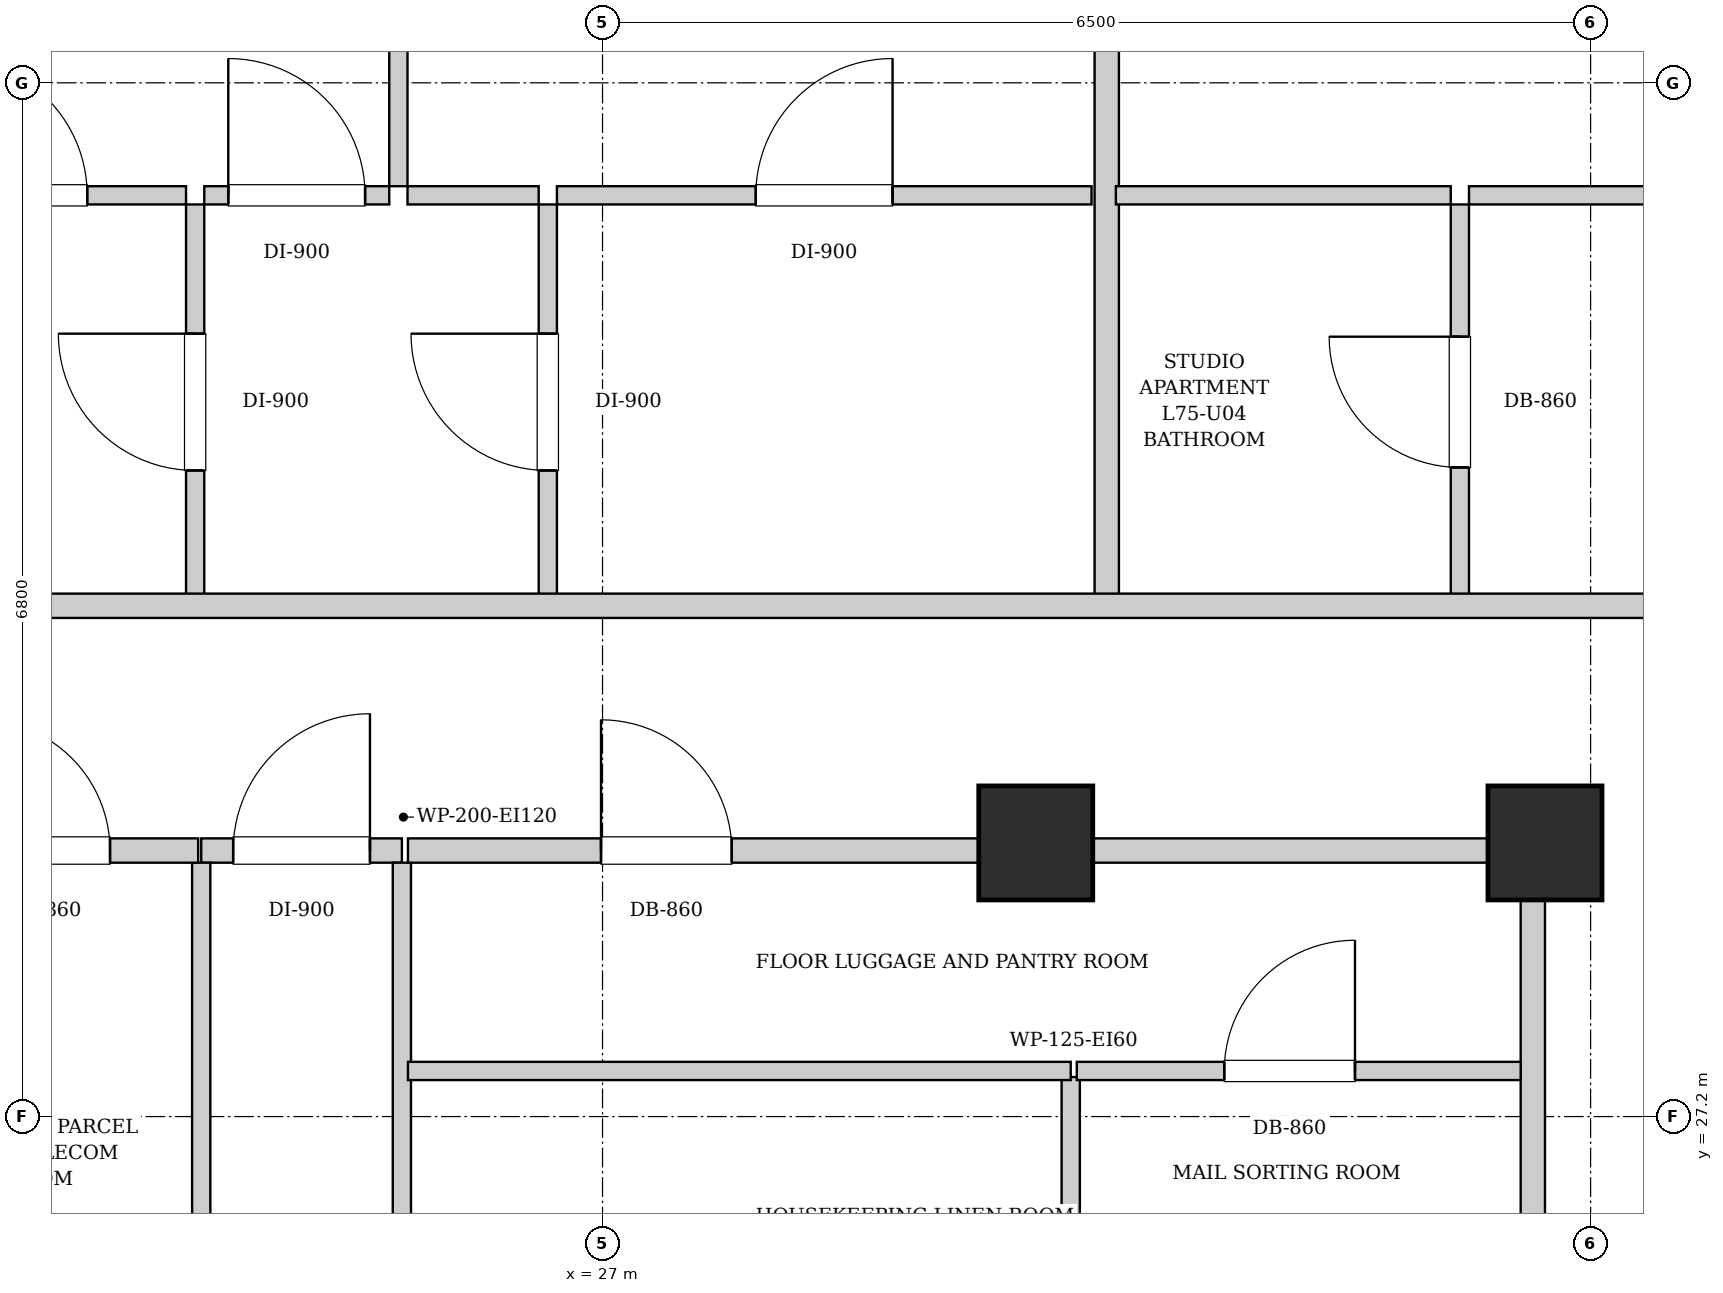
"""IFC4 building model, lengths in metres.
Left out: names, types, materials, properties, quantities, classifications, styles, units other than length and angle.
Written with IfcOpenShell. Run it as: python <this file> out.ifc"""

import sys

from ifc_helpers import new_model, si_unit, direction, frame, frame_2d, origin, origin_2d, place, context, subcontext, project, spatial, rectangle, extrude, element, fill, save


model = new_model("IFC4")
c1 = context("Model", 3, precision=1e-05, world=origin(), true_north=direction((0.0, 1.0)))
c2 = subcontext(c1, "Body", "Model", "MODEL_VIEW")
j1 = project(units=[si_unit("LENGTHUNIT", "METRE"), si_unit("PLANEANGLEUNIT", "RADIAN")], contexts=[c1])
p1 = place(None, origin())
s1 = spatial("IfcSite", under=j1, at=p1, CompositionType="ELEMENT")
p2 = place(p1, origin())
s2 = spatial("IfcBuilding", under=s1, at=p2, CompositionType="ELEMENT")
p3 = place(p2, frame((0.0, 0.0, 258.1)))
s3 = spatial("IfcBuildingStorey", under=s2, at=p3, CompositionType="ELEMENT", Elevation=258.1)
for number, where, z_axis, x_axis in (
    (1, (29.85, 29.0, 0.0), (0.0, 0.0, 1.0), (1.0, 0.0, 0.0)),
    (2, (33.2, 29.0, 0.0), (0.0, 0.0, 1.0), (1.0, 0.0, 0.0)),
):
    element("IfcColumn", number, at=place(p3, frame(where, z_axis=z_axis, x_axis=x_axis)), inside=s3, PredefinedType="COLUMN", context=c2, shape_type="SweptSolid", body=[
        extrude(rectangle(XDim=0.75, YDim=0.75, at=origin_2d()), origin(), (0.0, 0.0, 1.0), 3.4),
    ])
p4 = place(p3, frame((33.12, 24.12, 0.0), z_axis=(0.0, 0.0, 1.0), x_axis=(0.0, 1.0, 0.0)))
e3 = element("IfcWall", 3, at=p4, inside=s3, PredefinedType="PARTITIONING", context=c2, shape_type="SweptSolid", body=[
    extrude(rectangle(XDim=4.76, YDim=0.16, at=frame_2d((2.38, 0.0))), origin(), (0.0, 0.0, 1.0), 2.385),
])
p5 = place(p3, frame((24.36, 28.95, 0.0), z_axis=(0.0, 0.0, 1.0), x_axis=(1.0, 0.0, 0.0)))
e4 = element("IfcWall", 4, at=p5, inside=s3, PredefinedType="PARTITIONING", context=c2, shape_type="SweptSolid", body=[
    extrude(rectangle(XDim=1.32, YDim=0.16, at=frame_2d((0.66, 0.0))), origin(), (0.0, 0.0, 1.0), 2.578),
])
p6 = place(p5, frame((0.21, 0.0, 0.0)))
e5 = element("IfcOpeningElement", 5, at=p6, cuts=e4, PredefinedType="OPENING", context=c2, shape_type="SweptSolid", body=[
    extrude(rectangle(XDim=0.9, YDim=2.05, at=frame_2d((0.45, 1.025))), frame((0.0, 0.09, 0.0), z_axis=(0.0, -1.0, 0.0), x_axis=(1.0, 0.0, 0.0)), (0.0, 0.0, 1.0), 0.18),
])
for number, where, z_axis, x_axis in (
    (6, (24.36, 25.0, 0.0), (0.0, 0.0, 1.0), (0.0, 1.0, 0.0)),
    (7, (25.68, 25.0, 0.0), (0.0, 0.0, 1.0), (0.0, 1.0, 0.0)),
):
    element("IfcWall", number, at=place(p3, frame(where, z_axis=z_axis, x_axis=x_axis)), inside=s3, PredefinedType="PARTITIONING", context=c2, shape_type="SweptSolid", body=[
        extrude(rectangle(XDim=3.87, YDim=0.12, at=frame_2d((1.935, 0.0))), origin(), (0.0, 0.0, 1.0), 3.05),
    ])
p7 = place(p3, frame((30.08, 26.18, 0.0), z_axis=(0.0, 0.0, 1.0), x_axis=(0.0, 1.0, 0.0)))
e8 = element("IfcWall", 8, at=p7, inside=s3, PredefinedType="PARTITIONING", context=c2, shape_type="SweptSolid", body=[
    extrude(rectangle(XDim=1.28, YDim=0.12, at=frame_2d((0.64, 0.0))), origin(), (0.0, 0.0, 1.0), 3.05),
])
p8 = place(p3, frame((30.12, 27.5, 0.0), z_axis=(0.0, 0.0, 1.0), x_axis=(1.0, 0.0, 0.0)))
e9 = element("IfcWall", 9, at=p8, inside=s3, PredefinedType="PARTITIONING", context=c2, shape_type="SweptSolid", body=[
    extrude(rectangle(XDim=2.92, YDim=0.12, at=frame_2d((1.46, 0.0))), origin(), (0.0, 0.0, 1.0), 3.05),
])
p9 = place(p8, frame((0.97, 0.0, 0.0)))
e10 = element("IfcOpeningElement", 10, at=p9, cuts=e9, PredefinedType="OPENING", context=c2, shape_type="SweptSolid", body=[
    extrude(rectangle(XDim=0.86, YDim=2.05, at=frame_2d((0.43, 1.025))), frame((0.0, 0.07, 0.0), z_axis=(0.0, -1.0, 0.0), x_axis=(1.0, 0.0, 0.0)), (0.0, 0.0, 1.0), 0.14),
])
p10 = place(p3, frame((22.28, 28.95, 0.0), z_axis=(0.0, 0.0, 1.0), x_axis=(1.0, 0.0, 0.0)))
e11 = element("IfcWall", 11, at=p10, inside=s3, PredefinedType="PARTITIONING", context=c2, shape_type="SweptSolid", body=[
    extrude(rectangle(XDim=2.06, YDim=0.16, at=frame_2d((1.03, 0.0))), origin(), (0.0, 0.0, 1.0), 2.578),
])
p11 = place(p10, frame((0.62, 0.0, 0.0)))
e12 = element("IfcOpeningElement", 12, at=p11, cuts=e11, PredefinedType="OPENING", context=c2, shape_type="SweptSolid", body=[
    extrude(rectangle(XDim=0.86, YDim=2.05, at=frame_2d((0.43, 1.025))), frame((0.0, 0.09, 0.0), z_axis=(0.0, -1.0, 0.0), x_axis=(1.0, 0.0, 0.0)), (0.0, 0.0, 1.0), 0.18),
])
p12 = place(p3, frame((25.72, 27.5, 0.0), z_axis=(0.0, 0.0, 1.0), x_axis=(1.0, 0.0, 0.0)))
e13 = element("IfcWall", 13, at=p12, inside=s3, PredefinedType="PARTITIONING", context=c2, shape_type="SweptSolid", body=[
    extrude(rectangle(XDim=4.36, YDim=0.12, at=frame_2d((2.18, 0.0))), origin(), (0.0, 0.0, 1.0), 3.05),
])
p13 = place(p3, frame((25.72, 28.95, 0.0), z_axis=(0.0, 0.0, 1.0), x_axis=(1.0, 0.0, 0.0)))
e14 = element("IfcWall", 14, at=p13, inside=s3, PredefinedType="PARTITIONING", context=c2, shape_type="SweptSolid", body=[
    extrude(rectangle(XDim=7.32, YDim=0.16, at=frame_2d((3.66, 0.0))), origin(), (0.0, 0.0, 1.0), 2.578),
])
p14 = place(p13, frame((1.27, 0.0, 0.0)))
e15 = element("IfcOpeningElement", 15, at=p14, cuts=e14, PredefinedType="OPENING", context=c2, shape_type="SweptSolid", body=[
    extrude(rectangle(XDim=0.86, YDim=2.05, at=frame_2d((0.43, 1.025))), frame((0.0, 0.09, 0.0), z_axis=(0.0, -1.0, 0.0), x_axis=(1.0, 0.0, 0.0)), (0.0, 0.0, 1.0), 0.18),
])
p15 = place(p3, frame((24.32, 30.6, 0.0), z_axis=(0.0, 0.0, 1.0), x_axis=(0.0, 1.0, 0.0)))
e16 = element("IfcWall", 16, at=p15, inside=s3, PredefinedType="PARTITIONING", context=c2, shape_type="SweptSolid", body=[
    extrude(rectangle(XDim=2.6, YDim=0.12, at=frame_2d((1.3, 0.0))), origin(), (0.0, 0.0, 1.0), 3.05),
])
p16 = place(p15, frame((0.85, 0.0, 0.0)))
e17 = element("IfcOpeningElement", 17, at=p16, cuts=e16, PredefinedType="OPENING", context=c2, shape_type="SweptSolid", body=[
    extrude(rectangle(XDim=0.9, YDim=2.05, at=frame_2d((0.45, 1.025))), frame((0.0, 0.07, 0.0), z_axis=(0.0, -1.0, 0.0), x_axis=(1.0, 0.0, 0.0)), (0.0, 0.0, 1.0), 0.14),
])
p17 = place(p3, frame((22.06, 33.26, 0.0), z_axis=(0.0, 0.0, 1.0), x_axis=(1.0, 0.0, 0.0)))
e18 = element("IfcWall", 18, at=p17, inside=s3, PredefinedType="PARTITIONING", context=c2, shape_type="SweptSolid", body=[
    extrude(rectangle(XDim=2.2, YDim=0.12, at=frame_2d((1.1, 0.0))), origin(), (0.0, 0.0, 1.0), 3.05),
])
p18 = place(p17, frame((0.65, 0.0, 0.0)))
e19 = element("IfcOpeningElement", 19, at=p18, cuts=e18, PredefinedType="OPENING", context=c2, shape_type="SweptSolid", body=[
    extrude(rectangle(XDim=0.9, YDim=2.05, at=frame_2d((0.45, 1.025))), frame((0.0, 0.07, 0.0), z_axis=(0.0, -1.0, 0.0), x_axis=(1.0, 0.0, 0.0)), (0.0, 0.0, 1.0), 0.14),
])
p19 = place(p3, frame((26.64, 30.6, 0.0), z_axis=(0.0, 0.0, 1.0), x_axis=(0.0, 1.0, 0.0)))
e20 = element("IfcWall", 20, at=p19, inside=s3, PredefinedType="PARTITIONING", context=c2, shape_type="SweptSolid", body=[
    extrude(rectangle(XDim=2.6, YDim=0.12, at=frame_2d((1.3, 0.0))), origin(), (0.0, 0.0, 1.0), 3.05),
])
p20 = place(p19, frame((0.85, 0.0, 0.0)))
e21 = element("IfcOpeningElement", 21, at=p20, cuts=e20, PredefinedType="OPENING", context=c2, shape_type="SweptSolid", body=[
    extrude(rectangle(XDim=0.9, YDim=2.05, at=frame_2d((0.45, 1.025))), frame((0.0, 0.07, 0.0), z_axis=(0.0, -1.0, 0.0), x_axis=(1.0, 0.0, 0.0)), (0.0, 0.0, 1.0), 0.14),
])
p21 = place(p3, frame((24.38, 33.26, 0.0), z_axis=(0.0, 0.0, 1.0), x_axis=(1.0, 0.0, 0.0)))
e22 = element("IfcWall", 22, at=p21, inside=s3, PredefinedType="PARTITIONING", context=c2, shape_type="SweptSolid", body=[
    extrude(rectangle(XDim=1.217, YDim=0.12, at=frame_2d((0.608, 0.0))), origin(), (0.0, 0.0, 1.0), 3.05),
])
p22 = place(p21, frame((0.158, 0.0, 0.0)))
e23 = element("IfcOpeningElement", 23, at=p22, cuts=e22, PredefinedType="OPENING", context=c2, shape_type="SweptSolid", body=[
    extrude(rectangle(XDim=0.9, YDim=2.05, at=frame_2d((0.45, 1.025))), frame((0.0, 0.07, 0.0), z_axis=(0.0, -1.0, 0.0), x_axis=(1.0, 0.0, 0.0)), (0.0, 0.0, 1.0), 0.14),
])
p23 = place(p3, frame((25.717, 33.26, 0.0), z_axis=(0.0, 0.0, 1.0), x_axis=(1.0, 0.0, 0.0)))
e24 = element("IfcWall", 24, at=p23, inside=s3, PredefinedType="PARTITIONING", context=c2, shape_type="SweptSolid", body=[
    extrude(rectangle(XDim=0.863, YDim=0.12, at=frame_2d((0.432, 0.0))), origin(), (0.0, 0.0, 1.0), 3.05),
])
p24 = place(p3, frame((26.7, 33.26, 0.0), z_axis=(0.0, 0.0, 1.0), x_axis=(1.0, 0.0, 0.0)))
e25 = element("IfcWall", 25, at=p24, inside=s3, PredefinedType="PARTITIONING", context=c2, shape_type="SweptSolid", body=[
    extrude(rectangle(XDim=3.517, YDim=0.12, at=frame_2d((1.759, 0.0))), origin(), (0.0, 0.0, 1.0), 3.05),
])
p25 = place(p24, frame((1.308, 0.0, 0.0)))
e26 = element("IfcOpeningElement", 26, at=p25, cuts=e25, PredefinedType="OPENING", context=c2, shape_type="SweptSolid", body=[
    extrude(rectangle(XDim=0.9, YDim=2.05, at=frame_2d((0.45, 1.025))), frame((0.0, 0.07, 0.0), z_axis=(0.0, -1.0, 0.0), x_axis=(1.0, 0.0, 0.0)), (0.0, 0.0, 1.0), 0.14),
])
p26 = place(p3, frame((25.657, 33.32, 0.0), z_axis=(0.0, 0.0, 1.0), x_axis=(0.0, 1.0, 0.0)))
e27 = element("IfcWall", 27, at=p26, inside=s3, PredefinedType="PARTITIONING", context=c2, shape_type="SweptSolid", body=[
    extrude(rectangle(XDim=6.6, YDim=0.12, at=frame_2d((3.3, 0.0))), origin(), (0.0, 0.0, 1.0), 3.05),
])
p27 = place(p26, frame((2.835, 0.0, 0.0)))
e28 = element("IfcOpeningElement", 28, at=p27, cuts=e27, PredefinedType="OPENING", context=c2, shape_type="SweptSolid", body=[
    extrude(rectangle(XDim=0.9, YDim=2.05, at=frame_2d((0.45, 1.025))), frame((0.0, 0.07, 0.0), z_axis=(0.0, -1.0, 0.0), x_axis=(1.0, 0.0, 0.0)), (0.0, 0.0, 1.0), 0.14),
])
p28 = place(p3, frame((30.317, 30.6, 0.0), z_axis=(0.0, 0.0, 1.0), x_axis=(0.0, 1.0, 0.0)))
e29 = element("IfcWall", 29, at=p28, inside=s3, PredefinedType="PARTITIONING", context=c2, shape_type="SweptSolid", body=[
    extrude(rectangle(XDim=9.32, YDim=0.16, at=frame_2d((4.66, 0.0))), origin(), (0.0, 0.0, 1.0), 3.05),
])
p29 = place(p3, frame((32.64, 30.6, 0.0), z_axis=(0.0, 0.0, 1.0), x_axis=(0.0, 1.0, 0.0)))
e30 = element("IfcWall", 30, at=p29, inside=s3, PredefinedType="PARTITIONING", context=c2, shape_type="SweptSolid", body=[
    extrude(rectangle(XDim=2.6, YDim=0.12, at=frame_2d((1.3, 0.0))), origin(), (0.0, 0.0, 1.0), 3.05),
])
p30 = place(p29, frame((0.87, 0.0, 0.0)))
e31 = element("IfcOpeningElement", 31, at=p30, cuts=e30, PredefinedType="OPENING", context=c2, shape_type="SweptSolid", body=[
    extrude(rectangle(XDim=0.86, YDim=2.05, at=frame_2d((0.43, 1.025))), frame((0.0, 0.07, 0.0), z_axis=(0.0, -1.0, 0.0), x_axis=(1.0, 0.0, 0.0)), (0.0, 0.0, 1.0), 0.14),
])
p31 = place(p3, frame((30.377, 33.26, 0.0), z_axis=(0.0, 0.0, 1.0), x_axis=(1.0, 0.0, 0.0)))
e32 = element("IfcWall", 32, at=p31, inside=s3, PredefinedType="PARTITIONING", context=c2, shape_type="SweptSolid", body=[
    extrude(rectangle(XDim=2.203, YDim=0.12, at=frame_2d((1.102, 0.0))), origin(), (0.0, 0.0, 1.0), 3.05),
])
p32 = place(p3, frame((32.7, 33.26, 0.0), z_axis=(0.0, 0.0, 1.0), x_axis=(1.0, 0.0, 0.0)))
e33 = element("IfcWall", 33, at=p32, inside=s3, PredefinedType="PARTITIONING", context=c2, shape_type="SweptSolid", body=[
    extrude(rectangle(XDim=5.02, YDim=0.12, at=frame_2d((2.51, 0.0))), origin(), (0.0, 0.0, 1.0), 3.05),
])
p33 = place(p32, frame((2.06, 0.0, 0.0)))
e34 = element("IfcOpeningElement", 34, at=p33, cuts=e33, PredefinedType="OPENING", context=c2, shape_type="SweptSolid", body=[
    extrude(rectangle(XDim=0.9, YDim=2.05, at=frame_2d((0.45, 1.025))), frame((0.0, 0.07, 0.0), z_axis=(0.0, -1.0, 0.0), x_axis=(1.0, 0.0, 0.0)), (0.0, 0.0, 1.0), 0.14),
])
p34 = place(p3, frame((13.15, 30.56, 0.0), z_axis=(0.0, 0.0, 1.0), x_axis=(1.0, 0.0, 0.0)))
e35 = element("IfcWall", 35, at=p34, inside=s3, PredefinedType="PARTITIONING", context=c2, shape_type="SweptSolid", body=[
    extrude(rectangle(XDim=24.6, YDim=0.16, at=frame_2d((12.3, 0.0))), origin(), (0.0, 0.0, 1.0), 3.05),
])
p35 = place(p34, frame((3.165, 0.0, 0.0)))
e36 = element("IfcOpeningElement", 36, at=p35, cuts=e35, PredefinedType="OPENING", context=c2, shape_type="SweptSolid", body=[
    extrude(rectangle(XDim=0.95, YDim=2.1, at=frame_2d((0.475, 1.05))), frame((0.0, 0.09, 0.0), z_axis=(0.0, -1.0, 0.0), x_axis=(1.0, 0.0, 0.0)), (0.0, 0.0, 1.0), 0.18),
])
p36 = place(p34, frame((21.55, 0.0, 0.0)))
e37 = element("IfcOpeningElement", 37, at=p36, cuts=e35, PredefinedType="OPENING", context=c2, shape_type="SweptSolid", body=[
    extrude(rectangle(XDim=0.95, YDim=2.1, at=frame_2d((0.475, 1.05))), frame((0.0, 0.09, 0.0), z_axis=(0.0, -1.0, 0.0), x_axis=(1.0, 0.0, 0.0)), (0.0, 0.0, 1.0), 0.18),
])
p37 = place(p6, origin())
e38 = element("IfcDoor", 38, at=p37, inside=s3, OperationType="SINGLE_SWING_RIGHT", PredefinedType="DOOR", context=c2, shape_type="SweptSolid", body=[
    extrude(rectangle(XDim=0.9, YDim=2.05, at=frame_2d((0.45, 1.025))), frame((0.0, 0.025, 0.0), z_axis=(0.0, -1.0, 0.0), x_axis=(1.0, 0.0, 0.0)), (0.0, 0.0, 1.0), 0.05),
])
fill(e5, e38)
p38 = place(p9, origin())
e39 = element("IfcDoor", 39, at=p38, inside=s3, OperationType="SINGLE_SWING_RIGHT", PredefinedType="DOOR", context=c2, shape_type="SweptSolid", body=[
    extrude(rectangle(XDim=0.86, YDim=2.05, at=frame_2d((0.43, 1.025))), frame((0.0, 0.025, 0.0), z_axis=(0.0, -1.0, 0.0), x_axis=(1.0, 0.0, 0.0)), (0.0, 0.0, 1.0), 0.05),
])
fill(e10, e39)
p39 = place(p11, origin())
e40 = element("IfcDoor", 40, at=p39, inside=s3, OperationType="SINGLE_SWING_LEFT", PredefinedType="DOOR", context=c2, shape_type="SweptSolid", body=[
    extrude(rectangle(XDim=0.86, YDim=2.05, at=frame_2d((0.43, 1.025))), frame((0.0, 0.025, 0.0), z_axis=(0.0, -1.0, 0.0), x_axis=(1.0, 0.0, 0.0)), (0.0, 0.0, 1.0), 0.05),
])
fill(e12, e40)
p40 = place(p14, origin())
e41 = element("IfcDoor", 41, at=p40, inside=s3, OperationType="SINGLE_SWING_LEFT", PredefinedType="DOOR", context=c2, shape_type="SweptSolid", body=[
    extrude(rectangle(XDim=0.86, YDim=2.05, at=frame_2d((0.43, 1.025))), frame((0.0, 0.025, 0.0), z_axis=(0.0, -1.0, 0.0), x_axis=(1.0, 0.0, 0.0)), (0.0, 0.0, 1.0), 0.05),
])
fill(e15, e41)
p41 = place(p16, origin())
e42 = element("IfcDoor", 42, at=p41, inside=s3, OperationType="SINGLE_SWING_RIGHT", PredefinedType="DOOR", context=c2, shape_type="SweptSolid", body=[
    extrude(rectangle(XDim=0.9, YDim=2.05, at=frame_2d((0.45, 1.025))), frame((0.0, 0.025, 0.0), z_axis=(0.0, -1.0, 0.0), x_axis=(1.0, 0.0, 0.0)), (0.0, 0.0, 1.0), 0.05),
])
fill(e17, e42)
p42 = place(p18, origin())
e43 = element("IfcDoor", 43, at=p42, inside=s3, OperationType="SINGLE_SWING_LEFT", PredefinedType="DOOR", context=c2, shape_type="SweptSolid", body=[
    extrude(rectangle(XDim=0.9, YDim=2.05, at=frame_2d((0.45, 1.025))), frame((0.0, 0.025, 0.0), z_axis=(0.0, -1.0, 0.0), x_axis=(1.0, 0.0, 0.0)), (0.0, 0.0, 1.0), 0.05),
])
fill(e19, e43)
p43 = place(p20, origin())
e44 = element("IfcDoor", 44, at=p43, inside=s3, OperationType="SINGLE_SWING_RIGHT", PredefinedType="DOOR", context=c2, shape_type="SweptSolid", body=[
    extrude(rectangle(XDim=0.9, YDim=2.05, at=frame_2d((0.45, 1.025))), frame((0.0, 0.025, 0.0), z_axis=(0.0, -1.0, 0.0), x_axis=(1.0, 0.0, 0.0)), (0.0, 0.0, 1.0), 0.05),
])
fill(e21, e44)
p44 = place(p22, origin())
e45 = element("IfcDoor", 45, at=p44, inside=s3, OperationType="SINGLE_SWING_LEFT", PredefinedType="DOOR", context=c2, shape_type="SweptSolid", body=[
    extrude(rectangle(XDim=0.9, YDim=2.05, at=frame_2d((0.45, 1.025))), frame((0.0, 0.025, 0.0), z_axis=(0.0, -1.0, 0.0), x_axis=(1.0, 0.0, 0.0)), (0.0, 0.0, 1.0), 0.05),
])
fill(e23, e45)
p45 = place(p25, origin())
e46 = element("IfcDoor", 46, at=p45, inside=s3, OperationType="SINGLE_SWING_RIGHT", PredefinedType="DOOR", context=c2, shape_type="SweptSolid", body=[
    extrude(rectangle(XDim=0.9, YDim=2.05, at=frame_2d((0.45, 1.025))), frame((0.0, 0.025, 0.0), z_axis=(0.0, -1.0, 0.0), x_axis=(1.0, 0.0, 0.0)), (0.0, 0.0, 1.0), 0.05),
])
fill(e26, e46)
p46 = place(p30, origin())
e47 = element("IfcDoor", 47, at=p46, inside=s3, OperationType="SINGLE_SWING_RIGHT", PredefinedType="DOOR", context=c2, shape_type="SweptSolid", body=[
    extrude(rectangle(XDim=0.86, YDim=2.05, at=frame_2d((0.43, 1.025))), frame((0.0, 0.025, 0.0), z_axis=(0.0, -1.0, 0.0), x_axis=(1.0, 0.0, 0.0)), (0.0, 0.0, 1.0), 0.05),
])
fill(e31, e47)
save(model, sys.argv[1])
